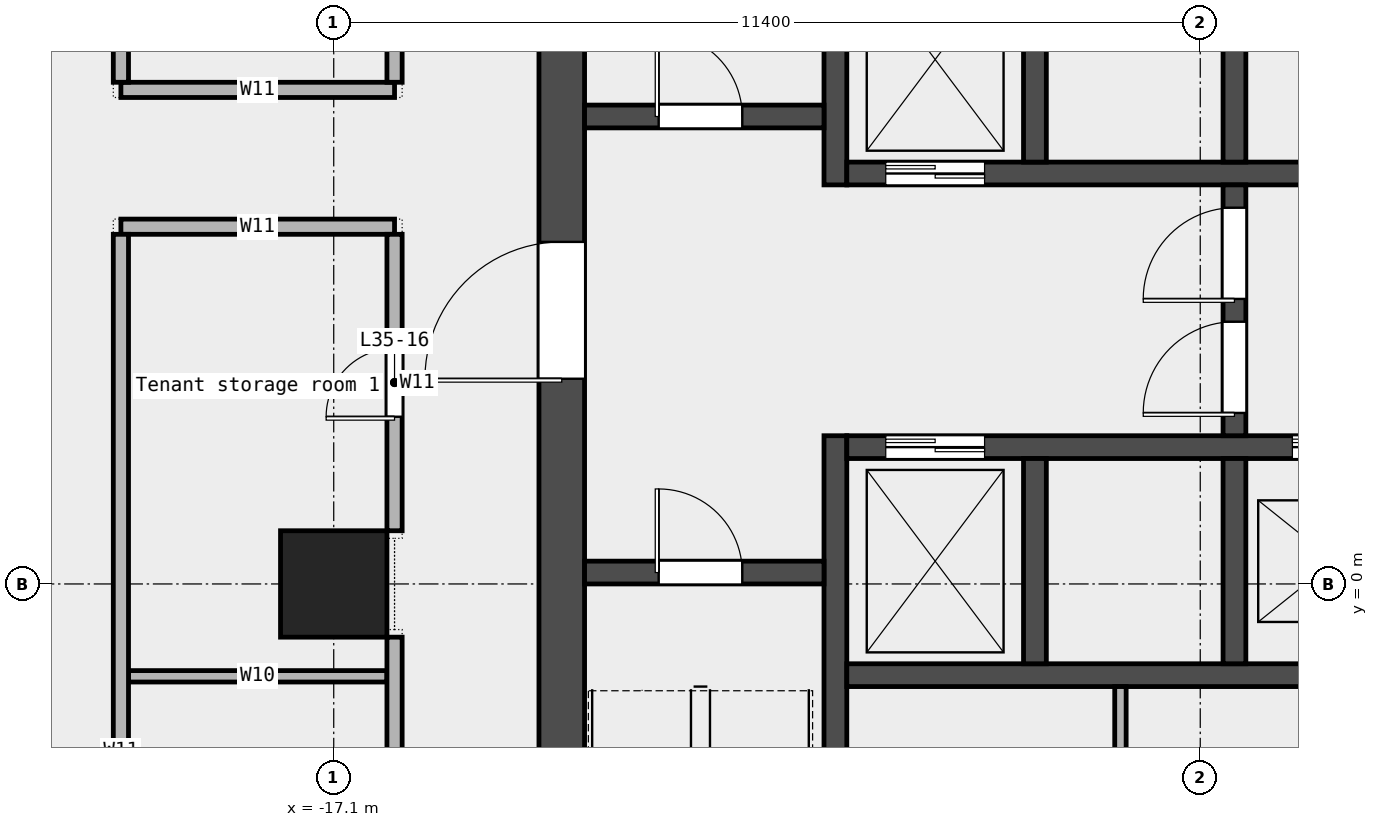
"""IFC4 building model, lengths in metres.
Left out: names, types, materials, properties, quantities, classifications, styles, units other than length and angle.
Written with IfcOpenShell. Run it as: python <this file> out.ifc"""

import sys

from ifc_helpers import new_model, si_unit, direction, frame, frame_2d, origin, origin_2d, place, context, subcontext, project, spatial, rectangle, extrude, element, fill, save


model = new_model("IFC4")
c1 = context("Model", 3, precision=1e-05, world=origin(), true_north=direction((0.0, 1.0)))
c2 = subcontext(c1, "Body", "Model", "MODEL_VIEW")
j1 = project(units=[si_unit("LENGTHUNIT", "METRE"), si_unit("PLANEANGLEUNIT", "RADIAN")], contexts=[c1])
p1 = place(None, origin())
s1 = spatial("IfcSite", under=j1, at=p1, CompositionType="ELEMENT")
p2 = place(p1, origin())
s2 = spatial("IfcBuilding", under=s1, at=p2, CompositionType="ELEMENT")
p3 = place(p2, frame((0.0, 0.0, 173.0)))
s3 = spatial("IfcBuildingStorey", under=s2, at=p3, CompositionType="ELEMENT", Elevation=173.0)
p4 = place(p3, frame((-17.1, 0.0, 0.0), z_axis=(0.0, 0.0, 1.0), x_axis=(1.0, 0.0, 0.0)))
e1 = element("IfcColumn", 1, at=p4, inside=s3, PredefinedType="COLUMN", context=c2, shape_type="SweptSolid", body=[
    extrude(rectangle(XDim=1.4, YDim=1.4, at=origin_2d()), origin(), (0.0, 0.0, 1.0), 3.6),
])
p5 = place(p3, frame((-19.8, -1.215, 0.0), z_axis=(0.0, 0.0, 1.0), x_axis=(1.0, 0.0, 0.0)))
e2 = element("IfcWall", 2, at=p5, inside=s3, PredefinedType="PARTITIONING", context=c2, shape_type="SweptSolid", body=[
    extrude(rectangle(XDim=3.4, YDim=0.15, at=frame_2d((1.7, 0.0))), origin(), (0.0, 0.0, 1.0), 3.6),
])
for number, where, z_axis, x_axis in (
    (3, (-19.9, 4.7, 0.0), (0.0, 0.0, 1.0), (1.0, 0.0, 0.0)),
    (4, (-19.9, 6.5, 0.0), (0.0, 0.0, 1.0), (1.0, 0.0, 0.0)),
):
    element("IfcWall", number, at=place(p3, frame(where, z_axis=z_axis, x_axis=x_axis)), inside=s3, PredefinedType="PARTITIONING", context=c2, shape_type="SweptSolid", body=[
        extrude(rectangle(XDim=3.6, YDim=0.2, at=frame_2d((1.8, 0.0))), origin(), (0.0, 0.0, 1.0), 3.6),
    ])
p6 = place(p3, frame((-19.9, -9.0, 0.0), z_axis=(0.0, 0.0, 1.0), x_axis=(0.0, 1.0, 0.0)))
e5 = element("IfcWall", 5, at=p6, inside=s3, PredefinedType="PARTITIONING", context=c2, shape_type="SweptSolid", body=[
    extrude(rectangle(XDim=13.6, YDim=0.2, at=frame_2d((6.8, 0.0))), origin(), (0.0, 0.0, 1.0), 3.6),
])
p7 = place(p3, frame((-19.9, 6.6, 0.0), z_axis=(0.0, 0.0, 1.0), x_axis=(0.0, 1.0, 0.0)))
e6 = element("IfcWall", 6, at=p7, inside=s3, PredefinedType="PARTITIONING", context=c2, shape_type="SweptSolid", body=[
    extrude(rectangle(XDim=8.7, YDim=0.2, at=frame_2d((4.35, 0.0))), origin(), (0.0, 0.0, 1.0), 3.6),
])
p8 = place(p3, frame((-16.3, -9.0, 0.0), z_axis=(0.0, 0.0, 1.0), x_axis=(0.0, 1.0, 0.0)))
e7 = element("IfcWall", 7, at=p8, inside=s3, PredefinedType="PARTITIONING", context=c2, shape_type="SweptSolid", body=[
    extrude(rectangle(XDim=8.3, YDim=0.2, at=frame_2d((4.15, 0.0))), origin(), (0.0, 0.0, 1.0), 3.6),
])
p9 = place(p8, frame((3.442, 0.0, 0.0)))
e8 = element("IfcOpeningElement", 8, at=p9, cuts=e7, PredefinedType="OPENING", context=c2, shape_type="SweptSolid", body=[
    extrude(rectangle(XDim=0.9, YDim=2.1, at=frame_2d((0.45, 1.05))), frame((0.0, 0.112, 0.0), z_axis=(0.0, -1.0, 0.0), x_axis=(1.0, 0.0, 0.0)), (0.0, 0.0, 1.0), 0.224),
])
p10 = place(p3, frame((-16.3, 0.7, 0.0), z_axis=(0.0, 0.0, 1.0), x_axis=(0.0, 1.0, 0.0)))
e9 = element("IfcWall", 9, at=p10, inside=s3, PredefinedType="PARTITIONING", context=c2, shape_type="SweptSolid", body=[
    extrude(rectangle(XDim=3.9, YDim=0.2, at=frame_2d((1.95, 0.0))), origin(), (0.0, 0.0, 1.0), 3.6),
])
p11 = place(p10, frame((1.5, 0.0, 0.0)))
e10 = element("IfcOpeningElement", 10, at=p11, cuts=e9, PredefinedType="OPENING", context=c2, shape_type="SweptSolid", body=[
    extrude(rectangle(XDim=0.9, YDim=2.1, at=frame_2d((0.45, 1.05))), frame((0.0, 0.112, 0.0), z_axis=(0.0, -1.0, 0.0), x_axis=(1.0, 0.0, 0.0)), (0.0, 0.0, 1.0), 0.224),
])
p12 = place(p3, frame((-16.3, 6.6, 0.0), z_axis=(0.0, 0.0, 1.0), x_axis=(0.0, 1.0, 0.0)))
e11 = element("IfcWall", 11, at=p12, inside=s3, PredefinedType="PARTITIONING", context=c2, shape_type="SweptSolid", body=[
    extrude(rectangle(XDim=3.7, YDim=0.2, at=frame_2d((1.85, 0.0))), origin(), (0.0, 0.0, 1.0), 3.6),
])
p13 = place(p12, frame((1.4, 0.0, 0.0)))
e12 = element("IfcOpeningElement", 12, at=p13, cuts=e11, PredefinedType="OPENING", context=c2, shape_type="SweptSolid", body=[
    extrude(rectangle(XDim=0.9, YDim=2.1, at=frame_2d((0.45, 1.05))), frame((0.0, 0.112, 0.0), z_axis=(0.0, -1.0, 0.0), x_axis=(1.0, 0.0, 0.0)), (0.0, 0.0, 1.0), 0.224),
])
p14 = place(p3, frame((-14.1, -6.6, 0.0), z_axis=(0.0, 0.0, 1.0), x_axis=(0.0, 1.0, 0.0)))
e13 = element("IfcWall", 13, at=p14, inside=s3, PredefinedType="SHEAR", context=c2, shape_type="SweptSolid", body=[
    extrude(rectangle(XDim=19.5, YDim=0.6, at=frame_2d((9.75, 0.0))), origin(), (0.0, 0.0, 1.0), 3.7),
])
p15 = place(p14, frame((9.3, 0.0, 0.0)))
e14 = element("IfcOpeningElement", 14, at=p15, cuts=e13, PredefinedType="OPENING", context=c2, shape_type="SweptSolid", body=[
    extrude(rectangle(XDim=1.8, YDim=2.1, at=frame_2d((0.9, 1.05))), frame((0.0, 0.312, 0.0), z_axis=(0.0, -1.0, 0.0), x_axis=(1.0, 0.0, 0.0)), (0.0, 0.0, 1.0), 0.624),
])
p16 = place(p3, frame((-10.5, -6.6, 0.0), z_axis=(0.0, 0.0, 1.0), x_axis=(0.0, 1.0, 0.0)))
e15 = element("IfcWall", 15, at=p16, inside=s3, PredefinedType="SHEAR", context=c2, shape_type="SweptSolid", body=[
    extrude(rectangle(XDim=8.55, YDim=0.3, at=frame_2d((4.275, 0.0))), origin(), (0.0, 0.0, 1.0), 3.7),
])
p17 = place(p3, frame((-10.5, 5.25, 0.0), z_axis=(0.0, 0.0, 1.0), x_axis=(0.0, 1.0, 0.0)))
e16 = element("IfcWall", 16, at=p17, inside=s3, PredefinedType="SHEAR", context=c2, shape_type="SweptSolid", body=[
    extrude(rectangle(XDim=7.65, YDim=0.3, at=frame_2d((3.825, 0.0))), origin(), (0.0, 0.0, 1.0), 3.7),
])
p18 = place(p3, frame((-13.8, 0.15, 0.0), z_axis=(0.0, 0.0, 1.0), x_axis=(1.0, 0.0, 0.0)))
e17 = element("IfcWall", 17, at=p18, inside=s3, PredefinedType="SOLIDWALL", context=c2, shape_type="SweptSolid", body=[
    extrude(rectangle(XDim=3.15, YDim=0.3, at=frame_2d((1.575, 0.0))), origin(), (0.0, 0.0, 1.0), 3.7),
])
p19 = place(p18, frame((0.975, 0.0, 0.0)))
e18 = element("IfcOpeningElement", 18, at=p19, cuts=e17, PredefinedType="OPENING", context=c2, shape_type="SweptSolid", body=[
    extrude(rectangle(XDim=1.1, YDim=2.1, at=frame_2d((0.55, 1.05))), frame((0.0, 0.162, 0.0), z_axis=(0.0, -1.0, 0.0), x_axis=(1.0, 0.0, 0.0)), (0.0, 0.0, 1.0), 0.324),
])
p20 = place(p3, frame((-13.8, 6.15, 0.0), z_axis=(0.0, 0.0, 1.0), x_axis=(1.0, 0.0, 0.0)))
e19 = element("IfcWall", 19, at=p20, inside=s3, PredefinedType="SOLIDWALL", context=c2, shape_type="SweptSolid", body=[
    extrude(rectangle(XDim=3.15, YDim=0.3, at=frame_2d((1.575, 0.0))), origin(), (0.0, 0.0, 1.0), 3.7),
])
p21 = place(p20, frame((0.975, 0.0, 0.0)))
e20 = element("IfcOpeningElement", 20, at=p21, cuts=e19, PredefinedType="OPENING", context=c2, shape_type="SweptSolid", body=[
    extrude(rectangle(XDim=1.1, YDim=2.1, at=frame_2d((0.55, 1.05))), frame((0.0, 0.162, 0.0), z_axis=(0.0, -1.0, 0.0), x_axis=(1.0, 0.0, 0.0)), (0.0, 0.0, 1.0), 0.324),
])
p22 = place(p3, frame((-10.35, -1.2, 0.0), z_axis=(0.0, 0.0, 1.0), x_axis=(1.0, 0.0, 0.0)))
e21 = element("IfcWall", 21, at=p22, inside=s3, PredefinedType="SOLIDWALL", context=c2, shape_type="SweptSolid", body=[
    extrude(rectangle(XDim=20.7, YDim=0.3, at=frame_2d((10.35, 0.0))), origin(), (0.0, 0.0, 1.0), 3.7),
])
p23 = place(p3, frame((-10.35, 1.8, 0.0), z_axis=(0.0, 0.0, 1.0), x_axis=(1.0, 0.0, 0.0)))
e22 = element("IfcWall", 22, at=p23, inside=s3, PredefinedType="SOLIDWALL", context=c2, shape_type="SweptSolid", body=[
    extrude(rectangle(XDim=20.7, YDim=0.3, at=frame_2d((10.35, 0.0))), origin(), (0.0, 0.0, 1.0), 3.7),
])
p24 = place(p23, frame((0.512, 0.0, 0.0)))
e23 = element("IfcOpeningElement", 23, at=p24, cuts=e22, PredefinedType="OPENING", context=c2, shape_type="SweptSolid", body=[
    extrude(rectangle(XDim=1.3, YDim=2.1, at=frame_2d((0.65, 1.05))), frame((0.0, 0.162, 0.0), z_axis=(0.0, -1.0, 0.0), x_axis=(1.0, 0.0, 0.0)), (0.0, 0.0, 1.0), 0.324),
])
p25 = place(p23, frame((5.863, 0.0, 0.0)))
e24 = element("IfcOpeningElement", 24, at=p25, cuts=e22, PredefinedType="OPENING", context=c2, shape_type="SweptSolid", body=[
    extrude(rectangle(XDim=1.1, YDim=2.1, at=frame_2d((0.55, 1.05))), frame((0.0, 0.162, 0.0), z_axis=(0.0, -1.0, 0.0), x_axis=(1.0, 0.0, 0.0)), (0.0, 0.0, 1.0), 0.324),
])
p26 = place(p23, frame((8.488, 0.0, 0.0)))
e25 = element("IfcOpeningElement", 25, at=p26, cuts=e22, PredefinedType="OPENING", context=c2, shape_type="SweptSolid", body=[
    extrude(rectangle(XDim=1.1, YDim=2.1, at=frame_2d((0.55, 1.05))), frame((0.0, 0.162, 0.0), z_axis=(0.0, -1.0, 0.0), x_axis=(1.0, 0.0, 0.0)), (0.0, 0.0, 1.0), 0.324),
])
p27 = place(p23, frame((11.113, 0.0, 0.0)))
e26 = element("IfcOpeningElement", 26, at=p27, cuts=e22, PredefinedType="OPENING", context=c2, shape_type="SweptSolid", body=[
    extrude(rectangle(XDim=1.1, YDim=2.1, at=frame_2d((0.55, 1.05))), frame((0.0, 0.162, 0.0), z_axis=(0.0, -1.0, 0.0), x_axis=(1.0, 0.0, 0.0)), (0.0, 0.0, 1.0), 0.324),
])
p28 = place(p23, frame((13.738, 0.0, 0.0)))
e27 = element("IfcOpeningElement", 27, at=p28, cuts=e22, PredefinedType="OPENING", context=c2, shape_type="SweptSolid", body=[
    extrude(rectangle(XDim=1.1, YDim=2.1, at=frame_2d((0.55, 1.05))), frame((0.0, 0.162, 0.0), z_axis=(0.0, -1.0, 0.0), x_axis=(1.0, 0.0, 0.0)), (0.0, 0.0, 1.0), 0.324),
])
p29 = place(p23, frame((16.363, 0.0, 0.0)))
e28 = element("IfcOpeningElement", 28, at=p29, cuts=e22, PredefinedType="OPENING", context=c2, shape_type="SweptSolid", body=[
    extrude(rectangle(XDim=1.1, YDim=2.1, at=frame_2d((0.55, 1.05))), frame((0.0, 0.162, 0.0), z_axis=(0.0, -1.0, 0.0), x_axis=(1.0, 0.0, 0.0)), (0.0, 0.0, 1.0), 0.324),
])
p30 = place(p23, frame((18.988, 0.0, 0.0)))
e29 = element("IfcOpeningElement", 29, at=p30, cuts=e22, PredefinedType="OPENING", context=c2, shape_type="SweptSolid", body=[
    extrude(rectangle(XDim=1.1, YDim=2.1, at=frame_2d((0.55, 1.05))), frame((0.0, 0.162, 0.0), z_axis=(0.0, -1.0, 0.0), x_axis=(1.0, 0.0, 0.0)), (0.0, 0.0, 1.0), 0.324),
])
p31 = place(p3, frame((-10.35, 5.4, 0.0), z_axis=(0.0, 0.0, 1.0), x_axis=(1.0, 0.0, 0.0)))
e30 = element("IfcWall", 30, at=p31, inside=s3, PredefinedType="SOLIDWALL", context=c2, shape_type="SweptSolid", body=[
    extrude(rectangle(XDim=20.7, YDim=0.3, at=frame_2d((10.35, 0.0))), origin(), (0.0, 0.0, 1.0), 3.7),
])
p32 = place(p31, frame((0.512, 0.0, 0.0)))
e31 = element("IfcOpeningElement", 31, at=p32, cuts=e30, PredefinedType="OPENING", context=c2, shape_type="SweptSolid", body=[
    extrude(rectangle(XDim=1.3, YDim=2.1, at=frame_2d((0.65, 1.05))), frame((0.0, 0.162, 0.0), z_axis=(0.0, -1.0, 0.0), x_axis=(1.0, 0.0, 0.0)), (0.0, 0.0, 1.0), 0.324),
])
for number, where, z_axis, x_axis in (
    (32, (-7.875, -1.05, 0.0), (0.0, 0.0, 1.0), (0.0, 1.0, 0.0)),
    (33, (-5.25, -1.05, 0.0), (0.0, 0.0, 1.0), (0.0, 1.0, 0.0)),
    (34, (-7.875, 5.55, 0.0), (0.0, 0.0, 1.0), (0.0, 1.0, 0.0)),
    (35, (-5.25, 5.55, 0.0), (0.0, 0.0, 1.0), (0.0, 1.0, 0.0)),
):
    element("IfcWall", number, at=place(p3, frame(where, z_axis=z_axis, x_axis=x_axis)), inside=s3, PredefinedType="SOLIDWALL", context=c2, shape_type="SweptSolid", body=[
        extrude(rectangle(XDim=2.7, YDim=0.3, at=frame_2d((1.35, 0.0))), origin(), (0.0, 0.0, 1.0), 3.7),
    ])
p33 = place(p3, frame((-5.25, 1.95, 0.0), z_axis=(0.0, 0.0, 1.0), x_axis=(0.0, 1.0, 0.0)))
e36 = element("IfcWall", 36, at=p33, inside=s3, PredefinedType="SOLIDWALL", context=c2, shape_type="SweptSolid", body=[
    extrude(rectangle(XDim=3.3, YDim=0.3, at=frame_2d((1.65, 0.0))), origin(), (0.0, 0.0, 1.0), 3.7),
])
p34 = place(p33, frame((0.3, 0.0, 0.0)))
e37 = element("IfcOpeningElement", 37, at=p34, cuts=e36, PredefinedType="OPENING", context=c2, shape_type="SweptSolid", body=[
    extrude(rectangle(XDim=1.2, YDim=2.1, at=frame_2d((0.6, 1.05))), frame((0.0, 0.162, 0.0), z_axis=(0.0, -1.0, 0.0), x_axis=(1.0, 0.0, 0.0)), (0.0, 0.0, 1.0), 0.324),
])
p35 = place(p33, frame((1.8, 0.0, 0.0)))
e38 = element("IfcOpeningElement", 38, at=p35, cuts=e36, PredefinedType="OPENING", context=c2, shape_type="SweptSolid", body=[
    extrude(rectangle(XDim=1.2, YDim=2.1, at=frame_2d((0.6, 1.05))), frame((0.0, 0.162, 0.0), z_axis=(0.0, -1.0, 0.0), x_axis=(1.0, 0.0, 0.0)), (0.0, 0.0, 1.0), 0.324),
])
p36 = place(p3, frame((-6.75, -6.6, 0.0), z_axis=(0.0, 0.0, 1.0), x_axis=(0.0, 1.0, 0.0)))
e39 = element("IfcWall", 39, at=p36, inside=s3, PredefinedType="PARTITIONING", context=c2, shape_type="SweptSolid", body=[
    extrude(rectangle(XDim=5.25, YDim=0.15, at=frame_2d((2.625, 0.0))), origin(), (0.0, 0.0, 1.0), 3.7),
])
p37 = place(p11, origin())
e40 = element("IfcDoor", 40, at=p37, inside=s3, OperationType="SINGLE_SWING_LEFT", PredefinedType="DOOR", context=c2, shape_type="SweptSolid", body=[
    extrude(rectangle(XDim=0.9, YDim=2.1, at=frame_2d((0.45, 1.05))), frame((0.0, 0.025, 0.0), z_axis=(0.0, -1.0, 0.0), x_axis=(1.0, 0.0, 0.0)), (0.0, 0.0, 1.0), 0.05),
])
fill(e10, e40)
p38 = place(p19, origin())
e41 = element("IfcDoor", 41, at=p38, inside=s3, OperationType="SINGLE_SWING_LEFT", PredefinedType="DOOR", context=c2, shape_type="SweptSolid", body=[
    extrude(rectangle(XDim=1.1, YDim=2.1, at=frame_2d((0.55, 1.05))), frame((0.0, 0.025, 0.0), z_axis=(0.0, -1.0, 0.0), x_axis=(1.0, 0.0, 0.0)), (0.0, 0.0, 1.0), 0.05),
])
fill(e18, e41)
p39 = place(p21, origin())
e42 = element("IfcDoor", 42, at=p39, inside=s3, OperationType="SINGLE_SWING_LEFT", PredefinedType="DOOR", context=c2, shape_type="SweptSolid", body=[
    extrude(rectangle(XDim=1.1, YDim=2.1, at=frame_2d((0.55, 1.05))), frame((0.0, 0.025, 0.0), z_axis=(0.0, -1.0, 0.0), x_axis=(1.0, 0.0, 0.0)), (0.0, 0.0, 1.0), 0.05),
])
fill(e20, e42)
p40 = place(p15, origin())
e43 = element("IfcDoor", 43, at=p40, inside=s3, OperationType="DOUBLE_DOOR_SINGLE_SWING", PredefinedType="DOOR", context=c2, shape_type="SweptSolid", body=[
    extrude(rectangle(XDim=1.8, YDim=2.1, at=frame_2d((0.9, 1.05))), frame((0.0, 0.025, 0.0), z_axis=(0.0, -1.0, 0.0), x_axis=(1.0, 0.0, 0.0)), (0.0, 0.0, 1.0), 0.05),
])
fill(e14, e43)
p41 = place(p34, origin())
e44 = element("IfcDoor", 44, at=p41, inside=s3, OperationType="SINGLE_SWING_LEFT", PredefinedType="DOOR", context=c2, shape_type="SweptSolid", body=[
    extrude(rectangle(XDim=1.2, YDim=2.1, at=frame_2d((0.6, 1.05))), frame((0.0, 0.025, 0.0), z_axis=(0.0, -1.0, 0.0), x_axis=(1.0, 0.0, 0.0)), (0.0, 0.0, 1.0), 0.05),
])
fill(e37, e44)
p42 = place(p35, origin())
e45 = element("IfcDoor", 45, at=p42, inside=s3, OperationType="SINGLE_SWING_RIGHT", PredefinedType="DOOR", context=c2, shape_type="SweptSolid", body=[
    extrude(rectangle(XDim=1.2, YDim=2.1, at=frame_2d((0.6, 1.05))), frame((0.0, 0.025, 0.0), z_axis=(0.0, -1.0, 0.0), x_axis=(1.0, 0.0, 0.0)), (0.0, 0.0, 1.0), 0.05),
])
fill(e38, e45)
p43 = place(p24, origin())
e46 = element("IfcDoor", 46, at=p43, inside=s3, OperationType="DOUBLE_DOOR_SLIDING", PredefinedType="DOOR", context=c2, shape_type="SweptSolid", body=[
    extrude(rectangle(XDim=1.3, YDim=2.1, at=frame_2d((0.65, 1.05))), frame((0.0, 0.025, 0.0), z_axis=(0.0, -1.0, 0.0), x_axis=(1.0, 0.0, 0.0)), (0.0, 0.0, 1.0), 0.05),
])
fill(e23, e46)
p44 = place(p25, origin())
e47 = element("IfcDoor", 47, at=p44, inside=s3, OperationType="DOUBLE_DOOR_SLIDING", PredefinedType="DOOR", context=c2, shape_type="SweptSolid", body=[
    extrude(rectangle(XDim=1.1, YDim=2.1, at=frame_2d((0.55, 1.05))), frame((0.0, 0.025, 0.0), z_axis=(0.0, -1.0, 0.0), x_axis=(1.0, 0.0, 0.0)), (0.0, 0.0, 1.0), 0.05),
])
fill(e24, e47)
p45 = place(p32, origin())
e48 = element("IfcDoor", 48, at=p45, inside=s3, OperationType="DOUBLE_DOOR_SLIDING", PredefinedType="DOOR", context=c2, shape_type="SweptSolid", body=[
    extrude(rectangle(XDim=1.3, YDim=2.1, at=frame_2d((0.65, 1.05))), frame((0.0, 0.025, 0.0), z_axis=(0.0, -1.0, 0.0), x_axis=(1.0, 0.0, 0.0)), (0.0, 0.0, 1.0), 0.05),
])
fill(e31, e48)
save(model, sys.argv[1])
